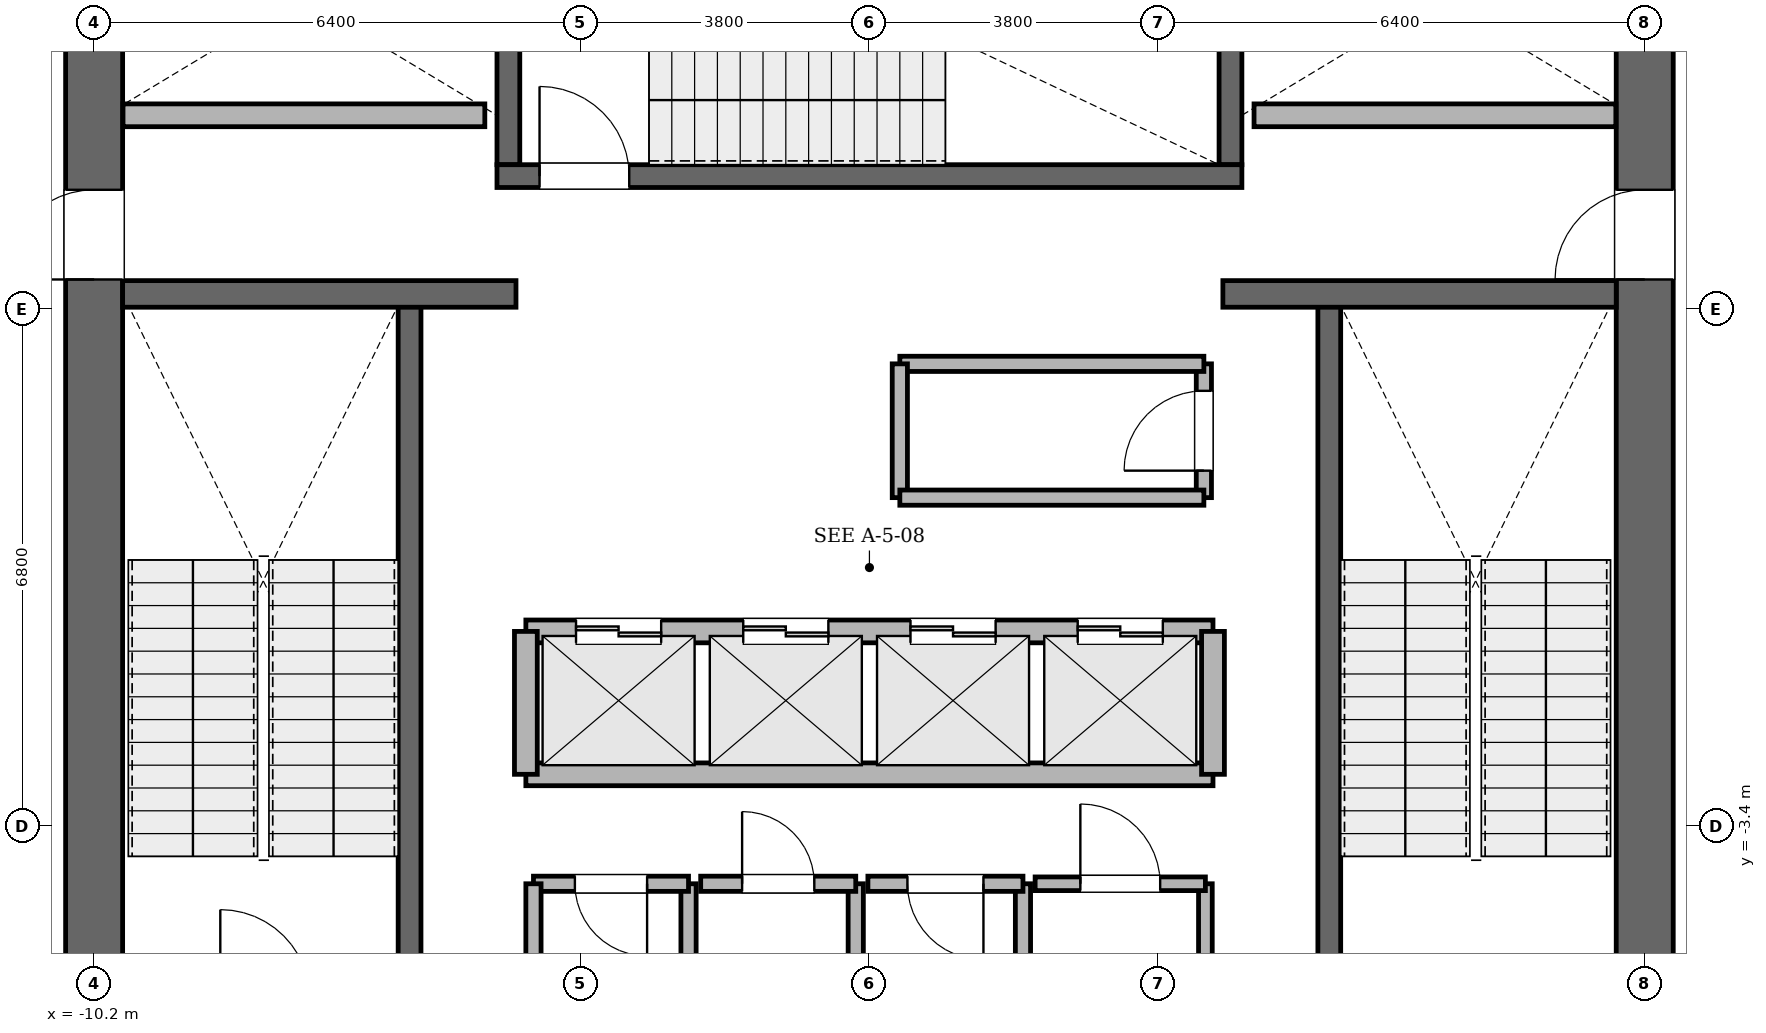
"""IFC4 building model, lengths in metres.
Left out: names, types, materials, properties, quantities, classifications, styles, units other than length and angle.
Written with IfcOpenShell. Run it as: python <this file> out.ifc"""

import sys

from ifc_helpers import new_model, si_unit, direction, frame, frame_2d, origin, place, context, subcontext, project, spatial, rectangle, extrude, element, fill, save


model = new_model("IFC4")
c1 = context("Model", 3, precision=1e-05, world=origin(), true_north=direction((0.0, 1.0)))
c2 = subcontext(c1, "Body", "Model", "MODEL_VIEW")
j1 = project(units=[si_unit("LENGTHUNIT", "METRE"), si_unit("PLANEANGLEUNIT", "RADIAN")], contexts=[c1])
p1 = place(None, origin())
s1 = spatial("IfcSite", under=j1, at=p1, CompositionType="ELEMENT")
p2 = place(p1, origin())
s2 = spatial("IfcBuilding", under=s1, at=p2, CompositionType="ELEMENT")
p3 = place(p2, frame((0.0, 0.0, 28.2)))
s3 = spatial("IfcBuildingStorey", under=s2, at=p3, CompositionType="ELEMENT", Elevation=28.2)
p4 = place(p3, frame((-10.2, -8.825, 0.0), z_axis=(0.0, 0.0, 1.0), x_axis=(0.0, 1.0, 0.0)))
e1 = element("IfcWall", 1, at=p4, inside=s3, PredefinedType="SHEAR", context=c2, shape_type="SweptSolid", body=[
    extrude(rectangle(XDim=17.65, YDim=0.75, at=frame_2d((8.825, 0.0))), origin(), (0.0, 0.0, 1.0), 4.05),
])
p5 = place(p4, frame((12.615, 0.0, 0.0)))
e2 = element("IfcOpeningElement", 2, at=p5, cuts=e1, PredefinedType="OPENING", context=c2, shape_type="SweptSolid", body=[
    extrude(rectangle(XDim=1.18, YDim=2.2, at=frame_2d((0.59, 1.1))), frame((0.0, 0.385, 0.0), z_axis=(0.0, -1.0, 0.0), x_axis=(1.0, 0.0, 0.0)), (0.0, 0.0, 1.0), 0.77),
])
p6 = place(p3, frame((10.2, 8.825, 0.0), z_axis=(0.0, 0.0, 1.0), x_axis=(0.0, -1.0, 0.0)))
e3 = element("IfcWall", 3, at=p6, inside=s3, PredefinedType="SHEAR", context=c2, shape_type="SweptSolid", body=[
    extrude(rectangle(XDim=17.65, YDim=0.75, at=frame_2d((8.825, 0.0))), origin(), (0.0, 0.0, 1.0), 4.05),
])
p7 = place(p6, frame((3.855, 0.0, 0.0)))
e4 = element("IfcOpeningElement", 4, at=p7, cuts=e3, PredefinedType="OPENING", context=c2, shape_type="SweptSolid", body=[
    extrude(rectangle(XDim=1.18, YDim=2.2, at=frame_2d((0.59, 1.1))), frame((0.0, 0.385, 0.0), z_axis=(0.0, -1.0, 0.0), x_axis=(1.0, 0.0, 0.0)), (0.0, 0.0, 1.0), 0.77),
])
for number, where, z_axis, x_axis in (
    (5, (-6.05, -5.5, 0.0), (0.0, 0.0, 1.0), (0.0, 1.0, 0.0)),
    (6, (6.05, 3.45, 0.0), (0.0, 0.0, 1.0), (0.0, -1.0, 0.0)),
):
    element("IfcWall", number, at=place(p3, frame(where, z_axis=z_axis, x_axis=x_axis)), inside=s3, PredefinedType="SOLIDWALL", context=c2, shape_type="SweptSolid", body=[
        extrude(rectangle(XDim=8.95, YDim=0.3, at=frame_2d((4.475, 0.0))), origin(), (0.0, 0.0, 1.0), 4.05),
    ])
for number, where, z_axis, x_axis in (
    (7, (-4.75, 5.3, 0.0), (0.0, 0.0, 1.0), (0.0, 1.0, 0.0)),
    (8, (4.75, 8.825, 0.0), (0.0, 0.0, 1.0), (0.0, -1.0, 0.0)),
):
    element("IfcWall", number, at=place(p3, frame(where, z_axis=z_axis, x_axis=x_axis)), inside=s3, PredefinedType="SOLIDWALL", context=c2, shape_type="SweptSolid", body=[
        extrude(rectangle(XDim=3.525, YDim=0.3, at=frame_2d((1.762, 0.0))), origin(), (0.0, 0.0, 1.0), 4.05),
    ])
p8 = place(p3, frame((-4.9, 5.15, 0.0), z_axis=(0.0, 0.0, 1.0), x_axis=(1.0, 0.0, 0.0)))
e9 = element("IfcWall", 9, at=p8, inside=s3, PredefinedType="SOLIDWALL", context=c2, shape_type="SweptSolid", body=[
    extrude(rectangle(XDim=9.8, YDim=0.3, at=frame_2d((4.9, 0.0))), origin(), (0.0, 0.0, 1.0), 4.05),
])
p9 = place(p8, frame((0.56, 0.0, 0.0)))
e10 = element("IfcOpeningElement", 10, at=p9, cuts=e9, PredefinedType="OPENING", context=c2, shape_type="SweptSolid", body=[
    extrude(rectangle(XDim=1.18, YDim=2.2, at=frame_2d((0.59, 1.1))), frame((0.0, 0.16, 0.0), z_axis=(0.0, -1.0, 0.0), x_axis=(1.0, 0.0, 0.0)), (0.0, 0.0, 1.0), 0.32),
])
for number, where, z_axis, x_axis in (
    (11, (-9.825, 3.6, 0.0), (0.0, 0.0, 1.0), (1.0, 0.0, 0.0)),
    (12, (4.65, 3.6, 0.0), (0.0, 0.0, 1.0), (1.0, 0.0, 0.0)),
):
    element("IfcWall", number, at=place(p3, frame(where, z_axis=z_axis, x_axis=x_axis)), inside=s3, PredefinedType="SOLIDWALL", context=c2, shape_type="SweptSolid", body=[
        extrude(rectangle(XDim=5.175, YDim=0.35, at=frame_2d((2.587, 0.0))), origin(), (0.0, 0.0, 1.0), 4.05),
    ])
p10 = place(p3, frame((-4.52, -0.84, 0.0), z_axis=(0.0, 0.0, 1.0), x_axis=(1.0, 0.0, 0.0)))
e13 = element("IfcWall", 13, at=p10, inside=s3, PredefinedType="SOLIDWALL", context=c2, shape_type="SweptSolid", body=[
    extrude(rectangle(XDim=9.04, YDim=0.3, at=frame_2d((4.52, 0.0))), origin(), (0.0, 0.0, 1.0), 3.81),
])
p11 = place(p10, frame((0.66, 0.0, 0.0)))
e14 = element("IfcOpeningElement", 14, at=p11, cuts=e13, PredefinedType="OPENING", context=c2, shape_type="SweptSolid", body=[
    extrude(rectangle(XDim=1.12, YDim=2.25, at=frame_2d((0.56, 1.125))), frame((0.0, 0.16, 0.0), z_axis=(0.0, -1.0, 0.0), x_axis=(1.0, 0.0, 0.0)), (0.0, 0.0, 1.0), 0.32),
])
p12 = place(p10, frame((2.86, 0.0, 0.0)))
e15 = element("IfcOpeningElement", 15, at=p12, cuts=e13, PredefinedType="OPENING", context=c2, shape_type="SweptSolid", body=[
    extrude(rectangle(XDim=1.12, YDim=2.25, at=frame_2d((0.56, 1.125))), frame((0.0, 0.16, 0.0), z_axis=(0.0, -1.0, 0.0), x_axis=(1.0, 0.0, 0.0)), (0.0, 0.0, 1.0), 0.32),
])
p13 = place(p10, frame((5.06, 0.0, 0.0)))
e16 = element("IfcOpeningElement", 16, at=p13, cuts=e13, PredefinedType="OPENING", context=c2, shape_type="SweptSolid", body=[
    extrude(rectangle(XDim=1.12, YDim=2.25, at=frame_2d((0.56, 1.125))), frame((0.0, 0.16, 0.0), z_axis=(0.0, -1.0, 0.0), x_axis=(1.0, 0.0, 0.0)), (0.0, 0.0, 1.0), 0.32),
])
p14 = place(p10, frame((7.26, 0.0, 0.0)))
e17 = element("IfcOpeningElement", 17, at=p14, cuts=e13, PredefinedType="OPENING", context=c2, shape_type="SweptSolid", body=[
    extrude(rectangle(XDim=1.12, YDim=2.25, at=frame_2d((0.56, 1.125))), frame((0.0, 0.16, 0.0), z_axis=(0.0, -1.0, 0.0), x_axis=(1.0, 0.0, 0.0)), (0.0, 0.0, 1.0), 0.32),
])
p15 = place(p3, frame((-4.52, -2.72, 0.0), z_axis=(0.0, 0.0, 1.0), x_axis=(1.0, 0.0, 0.0)))
e18 = element("IfcWall", 18, at=p15, inside=s3, PredefinedType="SOLIDWALL", context=c2, shape_type="SweptSolid", body=[
    extrude(rectangle(XDim=9.04, YDim=0.3, at=frame_2d((4.52, 0.0))), origin(), (0.0, 0.0, 1.0), 3.81),
])
for number, where, z_axis, x_axis in (
    (19, (-4.52, -2.72, 0.0), (0.0, 0.0, 1.0), (0.0, 1.0, 0.0)),
    (20, (4.52, -2.72, 0.0), (0.0, 0.0, 1.0), (0.0, 1.0, 0.0)),
):
    element("IfcWall", number, at=place(p3, frame(where, z_axis=z_axis, x_axis=x_axis)), inside=s3, PredefinedType="SOLIDWALL", context=c2, shape_type="SweptSolid", body=[
        extrude(rectangle(XDim=1.88, YDim=0.3, at=frame_2d((0.94, 0.0))), origin(), (0.0, 0.0, 1.0), 3.81),
    ])
for number, where, z_axis, x_axis in (
    (21, (-9.82, 5.95, 0.0), (0.0, 0.0, 1.0), (1.0, 0.0, 0.0)),
    (22, (5.06, 5.95, 0.0), (0.0, 0.0, 1.0), (1.0, 0.0, 0.0)),
):
    element("IfcWall", number, at=place(p3, frame(where, z_axis=z_axis, x_axis=x_axis)), inside=s3, PredefinedType="SOLIDWALL", context=c2, shape_type="SweptSolid", body=[
        extrude(rectangle(XDim=4.76, YDim=0.3, at=frame_2d((2.38, 0.0))), origin(), (0.0, 0.0, 1.0), 3.81),
    ])
p16 = place(p3, frame((-2.38, -5.9, 0.0), z_axis=(0.0, 0.0, 1.0), x_axis=(0.0, 1.0, 0.0)))
e23 = element("IfcWall", 23, at=p16, inside=s3, PredefinedType="SOLIDWALL", context=c2, shape_type="SweptSolid", body=[
    extrude(rectangle(XDim=1.74, YDim=0.2, at=frame_2d((0.87, 0.0))), origin(), (0.0, 0.0, 1.0), 3.81),
])
p17 = place(p3, frame((-2.38, -4.16, 0.0), z_axis=(0.0, 0.0, 1.0), x_axis=(-1.0, 0.0, 0.0)))
e24 = element("IfcWall", 24, at=p17, inside=s3, PredefinedType="SOLIDWALL", context=c2, shape_type="SweptSolid", body=[
    extrude(rectangle(XDim=2.04, YDim=0.2, at=frame_2d((1.02, 0.0))), origin(), (0.0, 0.0, 1.0), 3.81),
])
p18 = place(p17, frame((0.545, 0.0, 0.0)))
e25 = element("IfcOpeningElement", 25, at=p18, cuts=e24, PredefinedType="OPENING", context=c2, shape_type="SweptSolid", body=[
    extrude(rectangle(XDim=0.95, YDim=2.15, at=frame_2d((0.475, 1.075))), frame((0.0, 0.11, 0.0), z_axis=(0.0, -1.0, 0.0), x_axis=(1.0, 0.0, 0.0)), (0.0, 0.0, 1.0), 0.22),
])
for number, where, z_axis, x_axis in (
    (26, (-4.42, -4.16, 0.0), (0.0, 0.0, 1.0), (0.0, -1.0, 0.0)),
    (27, (-0.18, -5.9, 0.0), (0.0, 0.0, 1.0), (0.0, 1.0, 0.0)),
):
    element("IfcWall", number, at=place(p3, frame(where, z_axis=z_axis, x_axis=x_axis)), inside=s3, PredefinedType="SOLIDWALL", context=c2, shape_type="SweptSolid", body=[
        extrude(rectangle(XDim=1.74, YDim=0.2, at=frame_2d((0.87, 0.0))), origin(), (0.0, 0.0, 1.0), 3.81),
    ])
p19 = place(p3, frame((-0.18, -4.16, 0.0), z_axis=(0.0, 0.0, 1.0), x_axis=(-1.0, 0.0, 0.0)))
e28 = element("IfcWall", 28, at=p19, inside=s3, PredefinedType="SOLIDWALL", context=c2, shape_type="SweptSolid", body=[
    extrude(rectangle(XDim=2.04, YDim=0.2, at=frame_2d((1.02, 0.0))), origin(), (0.0, 0.0, 1.0), 3.81),
])
p20 = place(p19, frame((0.545, 0.0, 0.0)))
e29 = element("IfcOpeningElement", 29, at=p20, cuts=e28, PredefinedType="OPENING", context=c2, shape_type="SweptSolid", body=[
    extrude(rectangle(XDim=0.95, YDim=2.15, at=frame_2d((0.475, 1.075))), frame((0.0, 0.11, 0.0), z_axis=(0.0, -1.0, 0.0), x_axis=(1.0, 0.0, 0.0)), (0.0, 0.0, 1.0), 0.22),
])
p21 = place(p3, frame((2.02, -5.9, 0.0), z_axis=(0.0, 0.0, 1.0), x_axis=(0.0, 1.0, 0.0)))
e30 = element("IfcWall", 30, at=p21, inside=s3, PredefinedType="SOLIDWALL", context=c2, shape_type="SweptSolid", body=[
    extrude(rectangle(XDim=1.74, YDim=0.2, at=frame_2d((0.87, 0.0))), origin(), (0.0, 0.0, 1.0), 3.81),
])
p22 = place(p3, frame((2.02, -4.16, 0.0), z_axis=(0.0, 0.0, 1.0), x_axis=(-1.0, 0.0, 0.0)))
e31 = element("IfcWall", 31, at=p22, inside=s3, PredefinedType="SOLIDWALL", context=c2, shape_type="SweptSolid", body=[
    extrude(rectangle(XDim=2.04, YDim=0.2, at=frame_2d((1.02, 0.0))), origin(), (0.0, 0.0, 1.0), 3.81),
])
p23 = place(p22, frame((0.52, 0.0, 0.0)))
e32 = element("IfcOpeningElement", 32, at=p23, cuts=e31, PredefinedType="OPENING", context=c2, shape_type="SweptSolid", body=[
    extrude(rectangle(XDim=1.0, YDim=2.15, at=frame_2d((0.5, 1.075))), frame((0.0, 0.11, 0.0), z_axis=(0.0, -1.0, 0.0), x_axis=(1.0, 0.0, 0.0)), (0.0, 0.0, 1.0), 0.22),
])
p24 = place(p3, frame((4.42, -5.9, 0.0), z_axis=(0.0, 0.0, 1.0), x_axis=(0.0, 1.0, 0.0)))
e33 = element("IfcWall", 33, at=p24, inside=s3, PredefinedType="PARTITIONING", context=c2, shape_type="SweptSolid", body=[
    extrude(rectangle(XDim=1.74, YDim=0.18, at=frame_2d((0.87, 0.0))), origin(), (0.0, 0.0, 1.0), 3.81),
])
p25 = place(p3, frame((4.42, -4.16, 0.0), z_axis=(0.0, 0.0, 1.0), x_axis=(-1.0, 0.0, 0.0)))
e34 = element("IfcWall", 34, at=p25, inside=s3, PredefinedType="PARTITIONING", context=c2, shape_type="SweptSolid", body=[
    extrude(rectangle(XDim=2.24, YDim=0.18, at=frame_2d((1.12, 0.0))), origin(), (0.0, 0.0, 1.0), 3.81),
])
p26 = place(p25, frame((0.595, 0.0, 0.0)))
e35 = element("IfcOpeningElement", 35, at=p26, cuts=e34, PredefinedType="OPENING", context=c2, shape_type="SweptSolid", body=[
    extrude(rectangle(XDim=1.05, YDim=2.2, at=frame_2d((0.525, 1.1))), frame((0.0, 0.1, 0.0), z_axis=(0.0, -1.0, 0.0), x_axis=(1.0, 0.0, 0.0)), (0.0, 0.0, 1.0), 0.2),
])
p27 = place(p3, frame((4.4, 0.92, 0.0), z_axis=(0.0, 0.0, 1.0), x_axis=(0.0, 1.0, 0.0)))
e36 = element("IfcWall", 36, at=p27, inside=s3, PredefinedType="SOLIDWALL", context=c2, shape_type="SweptSolid", body=[
    extrude(rectangle(XDim=1.76, YDim=0.2, at=frame_2d((0.88, 0.0))), origin(), (0.0, 0.0, 1.0), 3.81),
])
p28 = place(p27, frame((0.355, 0.0, 0.0)))
e37 = element("IfcOpeningElement", 37, at=p28, cuts=e36, PredefinedType="OPENING", context=c2, shape_type="SweptSolid", body=[
    extrude(rectangle(XDim=1.05, YDim=2.2, at=frame_2d((0.525, 1.1))), frame((0.0, 0.11, 0.0), z_axis=(0.0, -1.0, 0.0), x_axis=(1.0, 0.0, 0.0)), (0.0, 0.0, 1.0), 0.22),
])
p29 = place(p3, frame((4.4, 2.68, 0.0), z_axis=(0.0, 0.0, 1.0), x_axis=(-1.0, 0.0, 0.0)))
e38 = element("IfcWall", 38, at=p29, inside=s3, PredefinedType="SOLIDWALL", context=c2, shape_type="SweptSolid", body=[
    extrude(rectangle(XDim=4.0, YDim=0.2, at=frame_2d((2.0, 0.0))), origin(), (0.0, 0.0, 1.0), 3.81),
])
p30 = place(p3, frame((0.4, 2.68, 0.0), z_axis=(0.0, 0.0, 1.0), x_axis=(0.0, -1.0, 0.0)))
e39 = element("IfcWall", 39, at=p30, inside=s3, PredefinedType="SOLIDWALL", context=c2, shape_type="SweptSolid", body=[
    extrude(rectangle(XDim=1.76, YDim=0.2, at=frame_2d((0.88, 0.0))), origin(), (0.0, 0.0, 1.0), 3.81),
])
p31 = place(p3, frame((0.4, 0.92, 0.0), z_axis=(0.0, 0.0, 1.0), x_axis=(1.0, 0.0, 0.0)))
e40 = element("IfcWall", 40, at=p31, inside=s3, PredefinedType="SOLIDWALL", context=c2, shape_type="SweptSolid", body=[
    extrude(rectangle(XDim=4.0, YDim=0.2, at=frame_2d((2.0, 0.0))), origin(), (0.0, 0.0, 1.0), 3.81),
])
p32 = place(p9, origin())
e41 = element("IfcDoor", 41, at=p32, inside=s3, OperationType="SINGLE_SWING_LEFT", PredefinedType="DOOR", context=c2, shape_type="SweptSolid", body=[
    extrude(rectangle(XDim=1.18, YDim=2.2, at=frame_2d((0.59, 1.1))), frame((0.0, 0.025, 0.0), z_axis=(0.0, -1.0, 0.0), x_axis=(1.0, 0.0, 0.0)), (0.0, 0.0, 1.0), 0.05),
])
fill(e10, e41)
p33 = place(p5, origin())
e42 = element("IfcDoor", 42, at=p33, inside=s3, OperationType="SINGLE_SWING_LEFT", PredefinedType="DOOR", context=c2, shape_type="SweptSolid", body=[
    extrude(rectangle(XDim=1.18, YDim=2.2, at=frame_2d((0.59, 1.1))), frame((0.0, 0.025, 0.0), z_axis=(0.0, -1.0, 0.0), x_axis=(1.0, 0.0, 0.0)), (0.0, 0.0, 1.0), 0.05),
])
fill(e2, e42)
p34 = place(p7, origin())
e43 = element("IfcDoor", 43, at=p34, inside=s3, OperationType="SINGLE_SWING_RIGHT", PredefinedType="DOOR", context=c2, shape_type="SweptSolid", body=[
    extrude(rectangle(XDim=1.18, YDim=2.2, at=frame_2d((0.59, 1.1))), frame((0.0, 0.025, 0.0), z_axis=(0.0, -1.0, 0.0), x_axis=(1.0, 0.0, 0.0)), (0.0, 0.0, 1.0), 0.05),
])
fill(e4, e43)
p35 = place(p11, origin())
e44 = element("IfcDoor", 44, at=p35, inside=s3, OperationType="DOUBLE_DOOR_SLIDING", PredefinedType="DOOR", context=c2, shape_type="SweptSolid", body=[
    extrude(rectangle(XDim=1.12, YDim=2.25, at=frame_2d((0.56, 1.125))), frame((0.0, 0.025, 0.0), z_axis=(0.0, -1.0, 0.0), x_axis=(1.0, 0.0, 0.0)), (0.0, 0.0, 1.0), 0.05),
])
fill(e14, e44)
p36 = place(p12, origin())
e45 = element("IfcDoor", 45, at=p36, inside=s3, OperationType="DOUBLE_DOOR_SLIDING", PredefinedType="DOOR", context=c2, shape_type="SweptSolid", body=[
    extrude(rectangle(XDim=1.12, YDim=2.25, at=frame_2d((0.56, 1.125))), frame((0.0, 0.025, 0.0), z_axis=(0.0, -1.0, 0.0), x_axis=(1.0, 0.0, 0.0)), (0.0, 0.0, 1.0), 0.05),
])
fill(e15, e45)
p37 = place(p13, origin())
e46 = element("IfcDoor", 46, at=p37, inside=s3, OperationType="DOUBLE_DOOR_SLIDING", PredefinedType="DOOR", context=c2, shape_type="SweptSolid", body=[
    extrude(rectangle(XDim=1.12, YDim=2.25, at=frame_2d((0.56, 1.125))), frame((0.0, 0.025, 0.0), z_axis=(0.0, -1.0, 0.0), x_axis=(1.0, 0.0, 0.0)), (0.0, 0.0, 1.0), 0.05),
])
fill(e16, e46)
p38 = place(p14, origin())
e47 = element("IfcDoor", 47, at=p38, inside=s3, OperationType="DOUBLE_DOOR_SLIDING", PredefinedType="DOOR", context=c2, shape_type="SweptSolid", body=[
    extrude(rectangle(XDim=1.12, YDim=2.25, at=frame_2d((0.56, 1.125))), frame((0.0, 0.025, 0.0), z_axis=(0.0, -1.0, 0.0), x_axis=(1.0, 0.0, 0.0)), (0.0, 0.0, 1.0), 0.05),
])
fill(e17, e47)
p39 = place(p18, origin())
e48 = element("IfcDoor", 48, at=p39, inside=s3, OperationType="SINGLE_SWING_LEFT", PredefinedType="DOOR", context=c2, shape_type="SweptSolid", body=[
    extrude(rectangle(XDim=0.95, YDim=2.15, at=frame_2d((0.475, 1.075))), frame((0.0, 0.025, 0.0), z_axis=(0.0, -1.0, 0.0), x_axis=(1.0, 0.0, 0.0)), (0.0, 0.0, 1.0), 0.05),
])
fill(e25, e48)
p40 = place(p20, origin())
e49 = element("IfcDoor", 49, at=p40, inside=s3, OperationType="SINGLE_SWING_RIGHT", PredefinedType="DOOR", context=c2, shape_type="SweptSolid", body=[
    extrude(rectangle(XDim=0.95, YDim=2.15, at=frame_2d((0.475, 1.075))), frame((0.0, 0.025, 0.0), z_axis=(0.0, -1.0, 0.0), x_axis=(1.0, 0.0, 0.0)), (0.0, 0.0, 1.0), 0.05),
])
fill(e29, e49)
p41 = place(p23, origin())
e50 = element("IfcDoor", 50, at=p41, inside=s3, OperationType="SINGLE_SWING_LEFT", PredefinedType="DOOR", context=c2, shape_type="SweptSolid", body=[
    extrude(rectangle(XDim=1.0, YDim=2.15, at=frame_2d((0.5, 1.075))), frame((0.0, 0.025, 0.0), z_axis=(0.0, -1.0, 0.0), x_axis=(1.0, 0.0, 0.0)), (0.0, 0.0, 1.0), 0.05),
])
fill(e32, e50)
p42 = place(p26, origin())
e51 = element("IfcDoor", 51, at=p42, inside=s3, OperationType="SINGLE_SWING_RIGHT", PredefinedType="DOOR", context=c2, shape_type="SweptSolid", body=[
    extrude(rectangle(XDim=1.05, YDim=2.2, at=frame_2d((0.525, 1.1))), frame((0.0, 0.025, 0.0), z_axis=(0.0, -1.0, 0.0), x_axis=(1.0, 0.0, 0.0)), (0.0, 0.0, 1.0), 0.05),
])
fill(e35, e51)
p43 = place(p28, origin())
e52 = element("IfcDoor", 52, at=p43, inside=s3, OperationType="SINGLE_SWING_LEFT", PredefinedType="DOOR", context=c2, shape_type="SweptSolid", body=[
    extrude(rectangle(XDim=1.05, YDim=2.2, at=frame_2d((0.525, 1.1))), frame((0.0, 0.025, 0.0), z_axis=(0.0, -1.0, 0.0), x_axis=(1.0, 0.0, 0.0)), (0.0, 0.0, 1.0), 0.05),
])
fill(e37, e52)
save(model, sys.argv[1])
